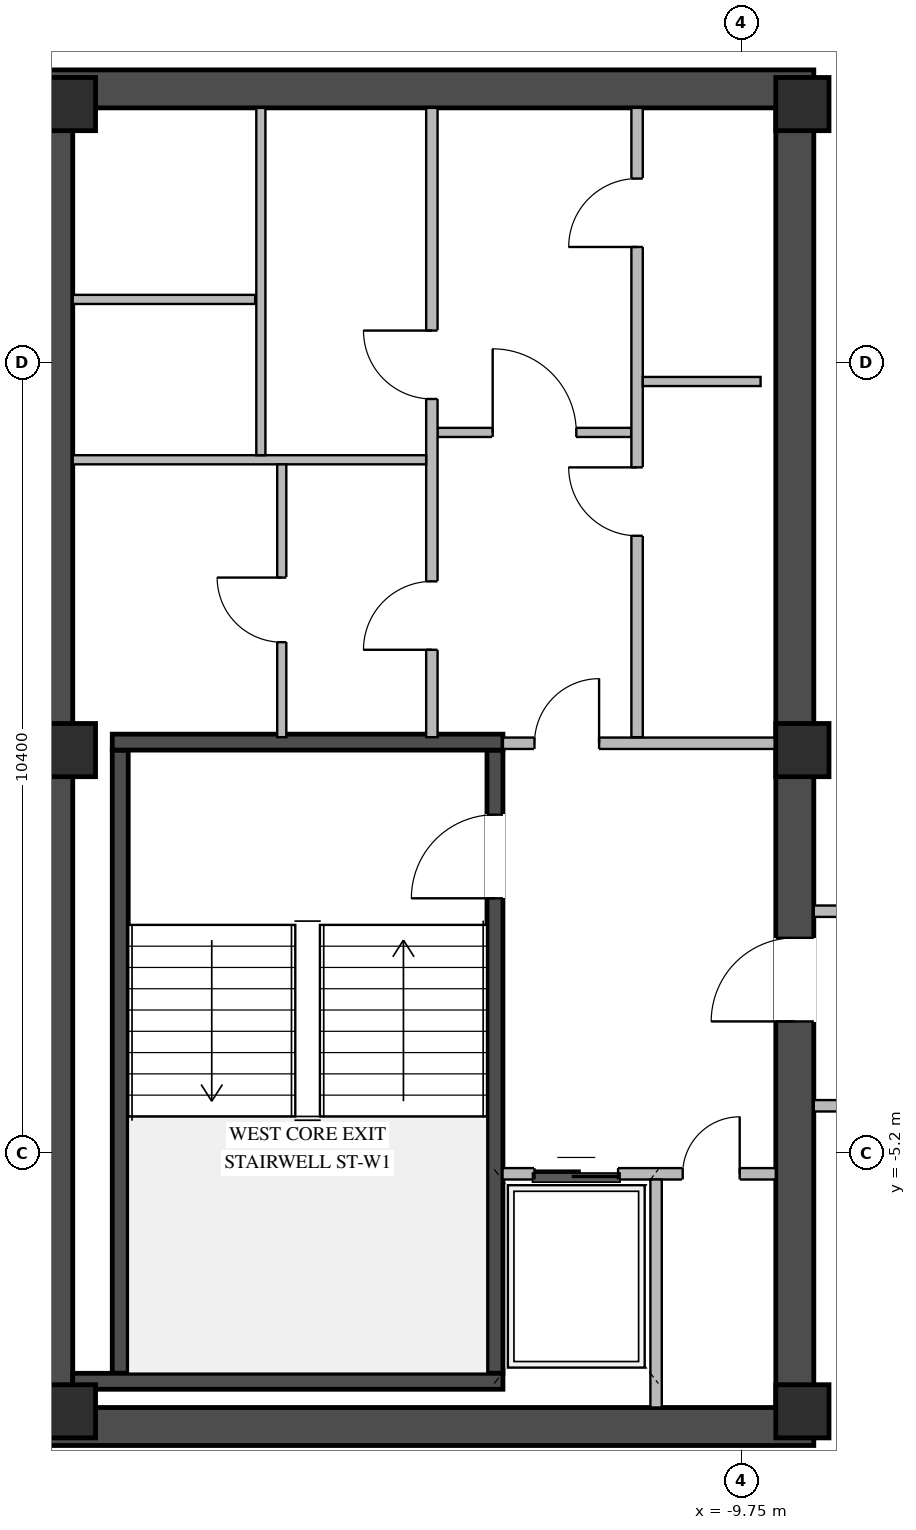
"""IFC4 building model, lengths in metres.
Left out: names, types, materials, properties, quantities, classifications, styles, units other than length and angle.
Written with IfcOpenShell. Run it as: python <this file> out.ifc"""

import sys

from ifc_helpers import new_model, si_unit, direction, frame, frame_2d, origin, origin_2d, place, context, subcontext, project, spatial, rectangle, extrude, element, fill, save


model = new_model("IFC4")
c1 = context("Model", 3, precision=1e-05, world=origin(), true_north=direction((0.0, 1.0)))
c2 = subcontext(c1, "Body", "Model", "MODEL_VIEW")
j1 = project(units=[si_unit("LENGTHUNIT", "METRE"), si_unit("PLANEANGLEUNIT", "RADIAN")], contexts=[c1])
p1 = place(None, origin())
s1 = spatial("IfcSite", under=j1, at=p1, CompositionType="ELEMENT")
p2 = place(p1, origin())
s2 = spatial("IfcBuilding", under=s1, at=p2, CompositionType="ELEMENT")
p3 = place(p2, frame((0.0, 0.0, 304.95)))
s3 = spatial("IfcBuildingStorey", under=s2, at=p3, CompositionType="ELEMENT", Elevation=304.95)
for number, where, z_axis, x_axis in (
    (1, (-19.05, -8.8, 0.0), (0.0, 0.0, 1.0), (1.0, 0.0, 0.0)),
    (2, (-19.05, 8.8, 0.0), (0.0, 0.0, 1.0), (1.0, 0.0, 0.0)),
):
    element("IfcWall", number, at=place(p3, frame(where, z_axis=z_axis, x_axis=x_axis)), inside=s3, PredefinedType="SHEAR", context=c2, shape_type="SweptSolid", body=[
        extrude(rectangle(XDim=10.25, YDim=0.5, at=frame_2d((5.125, 0.0))), origin(), (0.0, 0.0, 1.0), 3.35),
    ])
p4 = place(p3, frame((-18.8, -8.55, 0.0), z_axis=(0.0, 0.0, 1.0), x_axis=(0.0, 1.0, 0.0)))
e3 = element("IfcWall", 3, at=p4, inside=s3, PredefinedType="SHEAR", context=c2, shape_type="SweptSolid", body=[
    extrude(rectangle(XDim=17.1, YDim=0.5, at=frame_2d((8.55, 0.0))), origin(), (0.0, 0.0, 1.0), 3.35),
])
p5 = place(p3, frame((-9.05, -8.55, 0.0), z_axis=(0.0, 0.0, 1.0), x_axis=(0.0, 1.0, 0.0)))
e4 = element("IfcWall", 4, at=p5, inside=s3, PredefinedType="SHEAR", context=c2, shape_type="SweptSolid", body=[
    extrude(rectangle(XDim=17.1, YDim=0.5, at=frame_2d((8.55, 0.0))), origin(), (0.0, 0.0, 1.0), 3.35),
])
p6 = place(p5, frame((5.08, 0.0, 0.0)))
e5 = element("IfcOpeningElement", 5, at=p6, cuts=e4, PredefinedType="OPENING", context=c2, shape_type="SweptSolid", body=[
    extrude(rectangle(XDim=1.1, YDim=2.08, at=frame_2d((0.55, 1.04))), frame((0.0, 0.26, 0.0), z_axis=(0.0, -1.0, 0.0), x_axis=(1.0, 0.0, 0.0)), (0.0, 0.0, 1.0), 0.52),
])
p7 = place(p3, frame((-12.995, -8.1, 0.0), z_axis=(0.0, 0.0, 1.0), x_axis=(0.0, 1.0, 0.0)))
e6 = element("IfcWall", 6, at=p7, inside=s3, PredefinedType="SHEAR", context=c2, shape_type="SweptSolid", body=[
    extrude(rectangle(XDim=8.2, YDim=0.21, at=frame_2d((4.1, 0.0))), origin(), (0.0, 0.0, 1.0), 3.35),
])
p8 = place(p7, frame((6.25, 0.0, 0.0)))
e7 = element("IfcOpeningElement", 7, at=p8, cuts=e6, PredefinedType="OPENING", context=c2, shape_type="SweptSolid", body=[
    extrude(rectangle(XDim=1.1, YDim=2.15, at=frame_2d((0.55, 1.075))), frame((0.0, 0.115, 0.0), z_axis=(0.0, -1.0, 0.0), x_axis=(1.0, 0.0, 0.0)), (0.0, 0.0, 1.0), 0.23),
])
p9 = place(p3, frame((-17.925, -8.1, 0.0), z_axis=(0.0, 0.0, 1.0), x_axis=(0.0, 1.0, 0.0)))
e8 = element("IfcWall", 8, at=p9, inside=s3, PredefinedType="SHEAR", context=c2, shape_type="SweptSolid", body=[
    extrude(rectangle(XDim=8.2, YDim=0.21, at=frame_2d((4.1, 0.0))), origin(), (0.0, 0.0, 1.0), 3.35),
])
p10 = place(p3, frame((-18.55, -8.205, 0.0), z_axis=(0.0, 0.0, 1.0), x_axis=(1.0, 0.0, 0.0)))
e9 = element("IfcWall", 9, at=p10, inside=s3, PredefinedType="SHEAR", context=c2, shape_type="SweptSolid", body=[
    extrude(rectangle(XDim=5.66, YDim=0.21, at=frame_2d((2.83, 0.0))), origin(), (0.0, 0.0, 1.0), 3.35),
])
p11 = place(p3, frame((-12.89, 0.205, 0.0), z_axis=(0.0, 0.0, 1.0), x_axis=(-1.0, 0.0, 0.0)))
e10 = element("IfcWall", 10, at=p11, inside=s3, PredefinedType="SHEAR", context=c2, shape_type="SweptSolid", body=[
    extrude(rectangle(XDim=5.14, YDim=0.21, at=frame_2d((2.57, 0.0))), origin(), (0.0, 0.0, 1.0), 3.35),
])
for number, where, z_axis, x_axis in (
    (11, (-8.95, -8.6, 0.0), (0.0, 0.0, 1.0), (1.0, 0.0, 0.0)),
    (12, (-8.95, 0.1, 0.0), (0.0, 0.0, 1.0), (1.0, 0.0, 0.0)),
    (13, (-8.95, 8.6, 0.0), (0.0, 0.0, 1.0), (1.0, 0.0, 0.0)),
    (14, (-18.6, -8.6, 0.0), (0.0, 0.0, 1.0), (1.0, 0.0, 0.0)),
    (15, (-18.6, 0.1, 0.0), (0.0, 0.0, 1.0), (1.0, 0.0, 0.0)),
    (16, (-18.6, 8.6, 0.0), (0.0, 0.0, 1.0), (1.0, 0.0, 0.0)),
):
    element("IfcColumn", number, at=place(p3, frame(where, z_axis=z_axis, x_axis=x_axis)), inside=s3, PredefinedType="COLUMN", context=c2, shape_type="SweptSolid", body=[
        extrude(rectangle(XDim=0.7, YDim=0.7, at=origin_2d()), origin(), (0.0, 0.0, 1.0), 3.6),
    ])
p12 = place(p3, frame((-12.895, -5.475, 0.0), z_axis=(0.0, 0.0, 1.0), x_axis=(1.0, 0.0, 0.0)))
e17 = element("IfcWall", 17, at=p12, inside=s3, PredefinedType="STANDARD", context=c2, shape_type="SweptSolid", body=[
    extrude(rectangle(XDim=3.595, YDim=0.15, at=frame_2d((1.797, 0.0))), origin(), (0.0, 0.0, 1.0), 3.33),
])
p13 = place(p12, frame((0.42, 0.0, 0.0)))
e18 = element("IfcOpeningElement", 18, at=p13, cuts=e17, PredefinedType="OPENING", context=c2, shape_type="SweptSolid", body=[
    extrude(rectangle(XDim=1.1, YDim=2.15, at=frame_2d((0.55, 1.075))), frame((0.0, 0.085, 0.0), z_axis=(0.0, -1.0, 0.0), x_axis=(1.0, 0.0, 0.0)), (0.0, 0.0, 1.0), 0.17),
])
p14 = place(p12, frame((2.37, 0.0, 0.0)))
e19 = element("IfcOpeningElement", 19, at=p14, cuts=e17, PredefinedType="OPENING", context=c2, shape_type="SweptSolid", body=[
    extrude(rectangle(XDim=0.75, YDim=2.05, at=frame_2d((0.375, 1.025))), frame((0.0, 0.085, 0.0), z_axis=(0.0, -1.0, 0.0), x_axis=(1.0, 0.0, 0.0)), (0.0, 0.0, 1.0), 0.17),
])
p15 = place(p3, frame((-10.875, -8.55, 0.0), z_axis=(0.0, 0.0, 1.0), x_axis=(0.0, 1.0, 0.0)))
e20 = element("IfcWall", 20, at=p15, inside=s3, PredefinedType="STANDARD", context=c2, shape_type="SweptSolid", body=[
    extrude(rectangle(XDim=3.0, YDim=0.15, at=frame_2d((1.5, 0.0))), origin(), (0.0, 0.0, 1.0), 3.33),
])
p16 = place(p3, frame((-12.89, 0.19, 0.0), z_axis=(0.0, 0.0, 1.0), x_axis=(1.0, 0.0, 0.0)))
e21 = element("IfcWall", 21, at=p16, inside=s3, PredefinedType="STANDARD", context=c2, shape_type="SweptSolid", body=[
    extrude(rectangle(XDim=3.59, YDim=0.15, at=frame_2d((1.795, 0.0))), origin(), (0.0, 0.0, 1.0), 2.825),
])
p17 = place(p16, frame((0.415, 0.0, 0.0)))
e22 = element("IfcOpeningElement", 22, at=p17, cuts=e21, PredefinedType="OPENING", context=c2, shape_type="SweptSolid", body=[
    extrude(rectangle(XDim=0.85, YDim=2.04, at=frame_2d((0.425, 1.02))), frame((0.0, 0.085, 0.0), z_axis=(0.0, -1.0, 0.0), x_axis=(1.0, 0.0, 0.0)), (0.0, 0.0, 1.0), 0.17),
])
p18 = place(p3, frame((-13.75, 4.28, 0.0), z_axis=(0.0, 0.0, 1.0), x_axis=(1.0, 0.0, 0.0)))
e23 = element("IfcWall", 23, at=p18, inside=s3, PredefinedType="STANDARD", context=c2, shape_type="SweptSolid", body=[
    extrude(rectangle(XDim=2.55, YDim=0.12, at=frame_2d((1.275, 0.0))), origin(), (0.0, 0.0, 1.0), 3.33),
])
p19 = place(p18, frame((0.725, 0.0, 0.0)))
e24 = element("IfcOpeningElement", 24, at=p19, cuts=e23, PredefinedType="OPENING", context=c2, shape_type="SweptSolid", body=[
    extrude(rectangle(XDim=1.1, YDim=2.1, at=frame_2d((0.55, 1.05))), frame((0.0, 0.07, 0.0), z_axis=(0.0, -1.0, 0.0), x_axis=(1.0, 0.0, 0.0)), (0.0, 0.0, 1.0), 0.14),
])
p20 = place(p3, frame((-11.125, 0.27, 0.0), z_axis=(0.0, 0.0, 1.0), x_axis=(0.0, 1.0, 0.0)))
e25 = element("IfcWall", 25, at=p20, inside=s3, PredefinedType="STANDARD", context=c2, shape_type="SweptSolid", body=[
    extrude(rectangle(XDim=8.28, YDim=0.15, at=frame_2d((4.14, 0.0))), origin(), (0.0, 0.0, 1.0), 3.33),
])
p21 = place(p20, frame((2.65, 0.0, 0.0)))
e26 = element("IfcOpeningElement", 26, at=p21, cuts=e25, PredefinedType="OPENING", context=c2, shape_type="SweptSolid", body=[
    extrude(rectangle(XDim=0.9, YDim=2.05, at=frame_2d((0.45, 1.025))), frame((0.0, 0.085, 0.0), z_axis=(0.0, -1.0, 0.0), x_axis=(1.0, 0.0, 0.0)), (0.0, 0.0, 1.0), 0.17),
])
p22 = place(p20, frame((6.45, 0.0, 0.0)))
e27 = element("IfcOpeningElement", 27, at=p22, cuts=e25, PredefinedType="OPENING", context=c2, shape_type="SweptSolid", body=[
    extrude(rectangle(XDim=0.9, YDim=2.05, at=frame_2d((0.45, 1.025))), frame((0.0, 0.085, 0.0), z_axis=(0.0, -1.0, 0.0), x_axis=(1.0, 0.0, 0.0)), (0.0, 0.0, 1.0), 0.17),
])
p23 = place(p3, frame((-11.05, 4.95, 0.0), z_axis=(0.0, 0.0, 1.0), x_axis=(1.0, 0.0, 0.0)))
e28 = element("IfcWall", 28, at=p23, inside=s3, PredefinedType="STANDARD", context=c2, shape_type="SweptSolid", body=[
    extrude(rectangle(XDim=1.55, YDim=0.12, at=frame_2d((0.775, 0.0))), origin(), (0.0, 0.0, 1.0), 3.33),
])
p24 = place(p3, frame((-13.825, 0.27, 0.0), z_axis=(0.0, 0.0, 1.0), x_axis=(0.0, 1.0, 0.0)))
e29 = element("IfcWall", 29, at=p24, inside=s3, PredefinedType="STANDARD", context=c2, shape_type="SweptSolid", body=[
    extrude(rectangle(XDim=8.28, YDim=0.15, at=frame_2d((4.14, 0.0))), origin(), (0.0, 0.0, 1.0), 3.33),
])
p25 = place(p24, frame((4.45, 0.0, 0.0)))
e30 = element("IfcOpeningElement", 30, at=p25, cuts=e29, PredefinedType="OPENING", context=c2, shape_type="SweptSolid", body=[
    extrude(rectangle(XDim=0.9, YDim=2.05, at=frame_2d((0.45, 1.025))), frame((0.0, 0.085, 0.0), z_axis=(0.0, -1.0, 0.0), x_axis=(1.0, 0.0, 0.0)), (0.0, 0.0, 1.0), 0.17),
])
p26 = place(p24, frame((1.15, 0.0, 0.0)))
e31 = element("IfcOpeningElement", 31, at=p26, cuts=e29, PredefinedType="OPENING", context=c2, shape_type="SweptSolid", body=[
    extrude(rectangle(XDim=0.9, YDim=2.05, at=frame_2d((0.45, 1.025))), frame((0.0, 0.085, 0.0), z_axis=(0.0, -1.0, 0.0), x_axis=(1.0, 0.0, 0.0)), (0.0, 0.0, 1.0), 0.17),
])
p27 = place(p3, frame((-18.55, 3.92, 0.0), z_axis=(0.0, 0.0, 1.0), x_axis=(1.0, 0.0, 0.0)))
e32 = element("IfcWall", 32, at=p27, inside=s3, PredefinedType="STANDARD", context=c2, shape_type="SweptSolid", body=[
    extrude(rectangle(XDim=4.65, YDim=0.12, at=frame_2d((2.325, 0.0))), origin(), (0.0, 0.0, 1.0), 3.33),
])
p28 = place(p3, frame((-18.55, 6.03, 0.0), z_axis=(0.0, 0.0, 1.0), x_axis=(1.0, 0.0, 0.0)))
e33 = element("IfcWall", 33, at=p28, inside=s3, PredefinedType="STANDARD", context=c2, shape_type="SweptSolid", body=[
    extrude(rectangle(XDim=2.4, YDim=0.12, at=frame_2d((1.2, 0.0))), origin(), (0.0, 0.0, 1.0), 3.33),
])
p29 = place(p3, frame((-16.075, 3.98, 0.0), z_axis=(0.0, 0.0, 1.0), x_axis=(0.0, 1.0, 0.0)))
e34 = element("IfcWall", 34, at=p29, inside=s3, PredefinedType="STANDARD", context=c2, shape_type="SweptSolid", body=[
    extrude(rectangle(XDim=4.57, YDim=0.12, at=frame_2d((2.285, 0.0))), origin(), (0.0, 0.0, 1.0), 3.33),
])
p30 = place(p3, frame((-15.8, 0.27, 0.0), z_axis=(0.0, 0.0, 1.0), x_axis=(0.0, 1.0, 0.0)))
e35 = element("IfcWall", 35, at=p30, inside=s3, PredefinedType="STANDARD", context=c2, shape_type="SweptSolid", body=[
    extrude(rectangle(XDim=3.59, YDim=0.12, at=frame_2d((1.795, 0.0))), origin(), (0.0, 0.0, 1.0), 3.33),
])
p31 = place(p30, frame((1.25, 0.0, 0.0)))
e36 = element("IfcOpeningElement", 36, at=p31, cuts=e35, PredefinedType="OPENING", context=c2, shape_type="SweptSolid", body=[
    extrude(rectangle(XDim=0.85, YDim=2.05, at=frame_2d((0.425, 1.025))), frame((0.0, 0.07, 0.0), z_axis=(0.0, -1.0, 0.0), x_axis=(1.0, 0.0, 0.0)), (0.0, 0.0, 1.0), 0.14),
])
p32 = place(p3, frame((-8.8, -2.02, 0.0), z_axis=(0.0, 0.0, 1.0), x_axis=(1.0, 0.0, 0.0)))
e37 = element("IfcWall", 37, at=p32, inside=s3, PredefinedType="STANDARD", context=c2, shape_type="SweptSolid", body=[
    extrude(rectangle(XDim=17.6, YDim=0.15, at=frame_2d((8.8, 0.0))), origin(), (0.0, 0.0, 1.0), 3.33),
])
p33 = place(p32, frame((4.6, 0.0, 0.0)))
e38 = element("IfcOpeningElement", 38, at=p33, cuts=e37, PredefinedType="OPENING", context=c2, shape_type="SweptSolid", body=[
    extrude(rectangle(XDim=1.0, YDim=2.02, at=frame_2d((0.5, 1.01))), frame((0.0, 0.085, 0.0), z_axis=(0.0, -1.0, 0.0), x_axis=(1.0, 0.0, 0.0)), (0.0, 0.0, 1.0), 0.17),
])
p34 = place(p32, frame((13.4, 0.0, 0.0)))
e39 = element("IfcOpeningElement", 39, at=p34, cuts=e37, PredefinedType="OPENING", context=c2, shape_type="SweptSolid", body=[
    extrude(rectangle(XDim=1.0, YDim=2.02, at=frame_2d((0.5, 1.01))), frame((0.0, 0.085, 0.0), z_axis=(0.0, -1.0, 0.0), x_axis=(1.0, 0.0, 0.0)), (0.0, 0.0, 1.0), 0.17),
])
p35 = place(p3, frame((-8.8, -4.58, 0.0), z_axis=(0.0, 0.0, 1.0), x_axis=(1.0, 0.0, 0.0)))
e40 = element("IfcWall", 40, at=p35, inside=s3, PredefinedType="STANDARD", context=c2, shape_type="SweptSolid", body=[
    extrude(rectangle(XDim=17.6, YDim=0.15, at=frame_2d((8.8, 0.0))), origin(), (0.0, 0.0, 1.0), 3.33),
])
p36 = place(p35, frame((4.6, 0.0, 0.0)))
e41 = element("IfcOpeningElement", 41, at=p36, cuts=e40, PredefinedType="OPENING", context=c2, shape_type="SweptSolid", body=[
    extrude(rectangle(XDim=1.0, YDim=2.02, at=frame_2d((0.5, 1.01))), frame((0.0, 0.085, 0.0), z_axis=(0.0, -1.0, 0.0), x_axis=(1.0, 0.0, 0.0)), (0.0, 0.0, 1.0), 0.17),
])
p37 = place(p8, origin())
e42 = element("IfcDoor", 42, at=p37, inside=s3, OperationType="SINGLE_SWING_LEFT", PredefinedType="DOOR", context=c2, shape_type="SweptSolid", body=[
    extrude(rectangle(XDim=1.1, YDim=2.15, at=frame_2d((0.55, 1.075))), frame((0.0, 0.025, 0.0), z_axis=(0.0, -1.0, 0.0), x_axis=(1.0, 0.0, 0.0)), (0.0, 0.0, 1.0), 0.05),
])
fill(e7, e42)
p38 = place(p13, origin())
e43 = element("IfcDoor", 43, at=p38, inside=s3, OperationType="DOUBLE_DOOR_SLIDING", PredefinedType="DOOR", context=c2, shape_type="SweptSolid", body=[
    extrude(rectangle(XDim=1.1, YDim=2.15, at=frame_2d((0.55, 1.075))), frame((0.0, 0.025, 0.0), z_axis=(0.0, -1.0, 0.0), x_axis=(1.0, 0.0, 0.0)), (0.0, 0.0, 1.0), 0.05),
])
fill(e18, e43)
p39 = place(p14, origin())
e44 = element("IfcDoor", 44, at=p39, inside=s3, OperationType="SINGLE_SWING_RIGHT", PredefinedType="DOOR", context=c2, shape_type="SweptSolid", body=[
    extrude(rectangle(XDim=0.75, YDim=2.05, at=frame_2d((0.375, 1.025))), frame((0.0, 0.025, 0.0), z_axis=(0.0, -1.0, 0.0), x_axis=(1.0, 0.0, 0.0)), (0.0, 0.0, 1.0), 0.05),
])
fill(e19, e44)
p40 = place(p17, origin())
e45 = element("IfcDoor", 45, at=p40, inside=s3, OperationType="SINGLE_SWING_RIGHT", PredefinedType="DOOR", context=c2, shape_type="SweptSolid", body=[
    extrude(rectangle(XDim=0.85, YDim=2.04, at=frame_2d((0.425, 1.02))), frame((0.0, 0.025, 0.0), z_axis=(0.0, -1.0, 0.0), x_axis=(1.0, 0.0, 0.0)), (0.0, 0.0, 1.0), 0.05),
])
fill(e22, e45)
p41 = place(p6, origin())
e46 = element("IfcDoor", 46, at=p41, inside=s3, OperationType="SINGLE_SWING_LEFT", PredefinedType="DOOR", context=c2, shape_type="SweptSolid", body=[
    extrude(rectangle(XDim=1.1, YDim=2.08, at=frame_2d((0.55, 1.04))), frame((0.0, 0.205, 0.0), z_axis=(0.0, -1.0, 0.0), x_axis=(1.0, 0.0, 0.0)), (0.0, 0.0, 1.0), 0.05),
])
fill(e5, e46)
p42 = place(p19, origin())
e47 = element("IfcDoor", 47, at=p42, inside=s3, OperationType="SINGLE_SWING_LEFT", PredefinedType="DOOR", context=c2, shape_type="SweptSolid", body=[
    extrude(rectangle(XDim=1.1, YDim=2.1, at=frame_2d((0.55, 1.05))), frame((0.0, 0.025, 0.0), z_axis=(0.0, -1.0, 0.0), x_axis=(1.0, 0.0, 0.0)), (0.0, 0.0, 1.0), 0.05),
])
fill(e24, e47)
p43 = place(p21, origin())
e48 = element("IfcDoor", 48, at=p43, inside=s3, OperationType="SINGLE_SWING_RIGHT", PredefinedType="DOOR", context=c2, shape_type="SweptSolid", body=[
    extrude(rectangle(XDim=0.9, YDim=2.05, at=frame_2d((0.45, 1.025))), frame((0.0, 0.025, 0.0), z_axis=(0.0, -1.0, 0.0), x_axis=(1.0, 0.0, 0.0)), (0.0, 0.0, 1.0), 0.05),
])
fill(e26, e48)
p44 = place(p22, origin())
e49 = element("IfcDoor", 49, at=p44, inside=s3, OperationType="SINGLE_SWING_LEFT", PredefinedType="DOOR", context=c2, shape_type="SweptSolid", body=[
    extrude(rectangle(XDim=0.9, YDim=2.05, at=frame_2d((0.45, 1.025))), frame((0.0, 0.025, 0.0), z_axis=(0.0, -1.0, 0.0), x_axis=(1.0, 0.0, 0.0)), (0.0, 0.0, 1.0), 0.05),
])
fill(e27, e49)
p45 = place(p25, origin())
e50 = element("IfcDoor", 50, at=p45, inside=s3, OperationType="SINGLE_SWING_RIGHT", PredefinedType="DOOR", context=c2, shape_type="SweptSolid", body=[
    extrude(rectangle(XDim=0.9, YDim=2.05, at=frame_2d((0.45, 1.025))), frame((0.0, 0.025, 0.0), z_axis=(0.0, -1.0, 0.0), x_axis=(1.0, 0.0, 0.0)), (0.0, 0.0, 1.0), 0.05),
])
fill(e30, e50)
p46 = place(p26, origin())
e51 = element("IfcDoor", 51, at=p46, inside=s3, OperationType="SINGLE_SWING_LEFT", PredefinedType="DOOR", context=c2, shape_type="SweptSolid", body=[
    extrude(rectangle(XDim=0.9, YDim=2.05, at=frame_2d((0.45, 1.025))), frame((0.0, 0.025, 0.0), z_axis=(0.0, -1.0, 0.0), x_axis=(1.0, 0.0, 0.0)), (0.0, 0.0, 1.0), 0.05),
])
fill(e31, e51)
p47 = place(p31, origin())
e52 = element("IfcDoor", 52, at=p47, inside=s3, OperationType="SINGLE_SWING_RIGHT", PredefinedType="DOOR", context=c2, shape_type="SweptSolid", body=[
    extrude(rectangle(XDim=0.85, YDim=2.05, at=frame_2d((0.425, 1.025))), frame((0.0, 0.025, 0.0), z_axis=(0.0, -1.0, 0.0), x_axis=(1.0, 0.0, 0.0)), (0.0, 0.0, 1.0), 0.05),
])
fill(e36, e52)
save(model, sys.argv[1])
